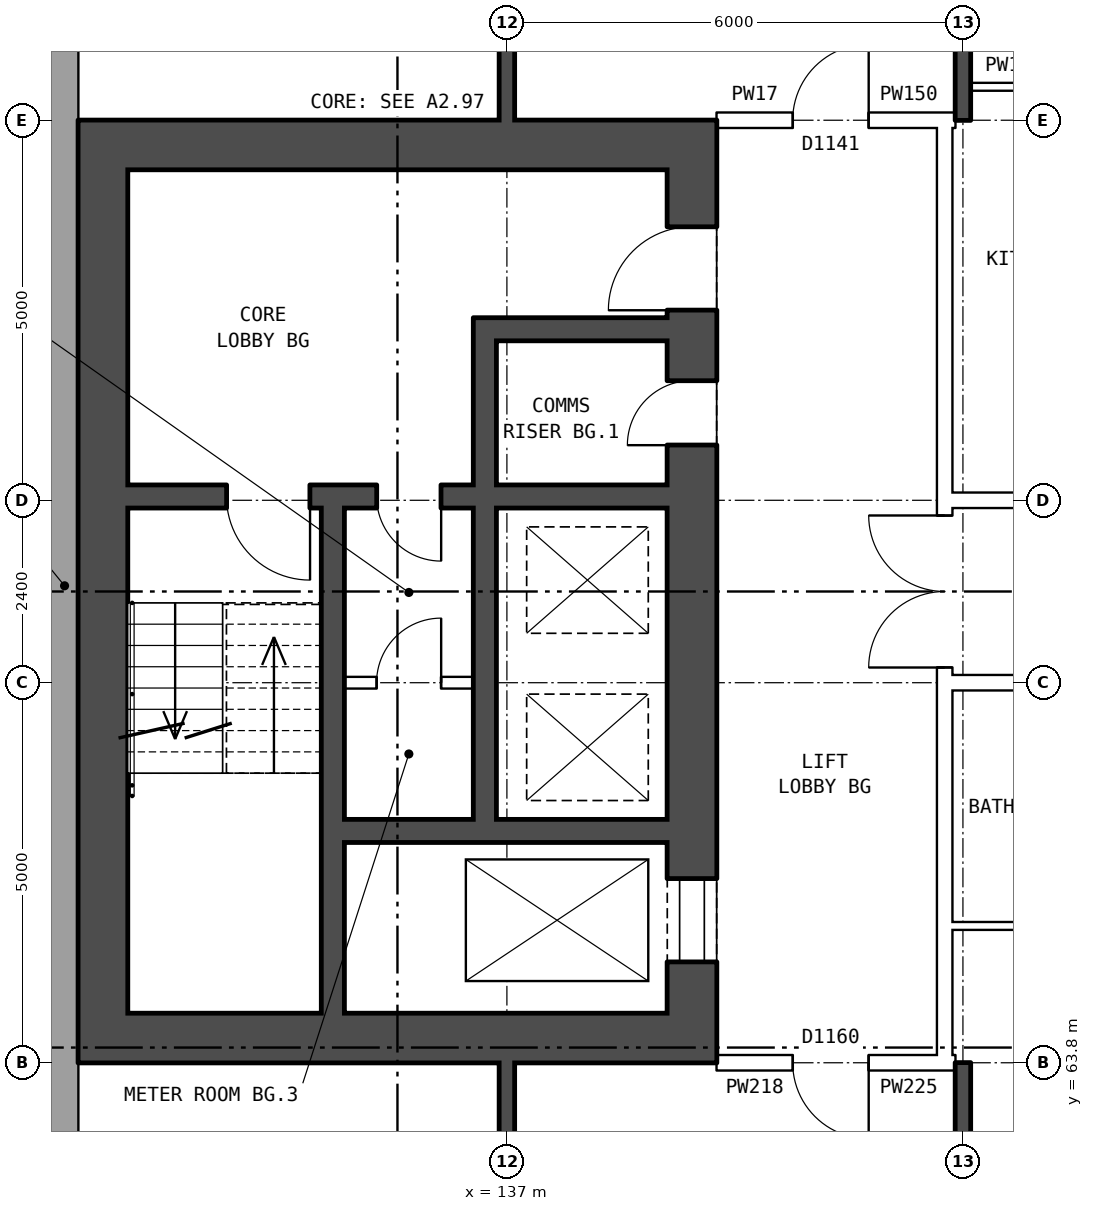
"""IFC4 building model, lengths in metres.
Left out: names, types, materials, properties, quantities, classifications, styles, units other than length and angle.
Written with IfcOpenShell. Run it as: python <this file> out.ifc"""

import sys

from ifc_helpers import new_model, si_unit, direction, frame, frame_2d, origin, place, context, subcontext, project, spatial, rectangle, extrude, element, fill, save


model = new_model("IFC4")
c1 = context("Model", 3, precision=1e-05, world=origin(), true_north=direction((0.0, 1.0)))
c2 = subcontext(c1, "Body", "Model", "MODEL_VIEW")
j1 = project(units=[si_unit("LENGTHUNIT", "METRE"), si_unit("PLANEANGLEUNIT", "RADIAN")], contexts=[c1])
p1 = place(None, origin())
s1 = spatial("IfcSite", under=j1, at=p1, CompositionType="ELEMENT")
p2 = place(p1, origin())
s2 = spatial("IfcBuilding", under=s1, at=p2, CompositionType="ELEMENT")
p3 = place(p2, frame((0.0, 0.0, 99.5)))
s3 = spatial("IfcBuildingStorey", under=s2, at=p3, CompositionType="ELEMENT", Elevation=99.5)
p4 = place(p3, frame((131.18, 82.925, 0.0), z_axis=(0.0, 0.0, 1.0), x_axis=(0.0, -1.0, 0.0)))
e1 = element("IfcWall", 1, at=p4, inside=s3, PredefinedType="STANDARD", context=c2, shape_type="SweptSolid", body=[
    extrude(rectangle(XDim=25.851, YDim=0.36, at=frame_2d((12.925, 0.0))), origin(), (0.0, 0.0, 1.0), 2.85),
])
p5 = place(p4, frame((1.625, 0.0, 0.8)))
e2 = element("IfcOpeningElement", 2, at=p5, cuts=e1, PredefinedType="OPENING", context=c2, shape_type="SweptSolid", body=[
    extrude(rectangle(XDim=1.6, YDim=1.8, at=frame_2d((0.8, 0.9))), frame((0.0, 0.19, 0.0), z_axis=(0.0, -1.0, 0.0), x_axis=(1.0, 0.0, 0.0)), (0.0, 0.0, 1.0), 0.38),
])
p6 = place(p4, frame((3.525, 0.0, 1.7)))
e3 = element("IfcOpeningElement", 3, at=p6, cuts=e1, PredefinedType="OPENING", context=c2, shape_type="SweptSolid", body=[
    extrude(rectangle(XDim=1.4, YDim=0.9, at=frame_2d((0.7, 0.45))), frame((0.0, 0.19, 0.0), z_axis=(0.0, -1.0, 0.0), x_axis=(1.0, 0.0, 0.0)), (0.0, 0.0, 1.0), 0.38),
])
p7 = place(p4, frame((20.775, 0.0, 1.7)))
e4 = element("IfcOpeningElement", 4, at=p7, cuts=e1, PredefinedType="OPENING", context=c2, shape_type="SweptSolid", body=[
    extrude(rectangle(XDim=1.4, YDim=0.9, at=frame_2d((0.7, 0.45))), frame((0.0, 0.19, 0.0), z_axis=(0.0, -1.0, 0.0), x_axis=(1.0, 0.0, 0.0)), (0.0, 0.0, 1.0), 0.38),
])
p8 = place(p4, frame((22.625, 0.0, 0.8)))
e5 = element("IfcOpeningElement", 5, at=p8, cuts=e1, PredefinedType="OPENING", context=c2, shape_type="SweptSolid", body=[
    extrude(rectangle(XDim=1.6, YDim=1.8, at=frame_2d((0.8, 0.9))), frame((0.0, 0.19, 0.0), z_axis=(0.0, -1.0, 0.0), x_axis=(1.0, 0.0, 0.0)), (0.0, 0.0, 1.0), 0.38),
])
p9 = place(p3, frame((139.435, 64.45, 0.0), z_axis=(0.0, 0.0, 1.0), x_axis=(0.0, 1.0, 0.0)))
e6 = element("IfcWall", 6, at=p9, inside=s3, PredefinedType="SHEAR", context=c2, shape_type="SweptSolid", body=[
    extrude(rectangle(XDim=11.1, YDim=0.65, at=frame_2d((5.55, 0.0))), origin(), (0.0, 0.0, 1.0), 2.85),
])
p10 = place(p9, frame((0.675, 0.0, 0.0)))
e7 = element("IfcOpeningElement", 7, at=p10, cuts=e6, PredefinedType="OPENING", context=c2, shape_type="SweptSolid", body=[
    extrude(rectangle(XDim=1.1, YDim=2.1, at=frame_2d((0.55, 1.05))), frame((0.0, 0.335, 0.0), z_axis=(0.0, -1.0, 0.0), x_axis=(1.0, 0.0, 0.0)), (0.0, 0.0, 1.0), 0.67),
])
p11 = place(p9, frame((9.25, 0.0, 0.0)))
e8 = element("IfcOpeningElement", 8, at=p11, cuts=e6, PredefinedType="OPENING", context=c2, shape_type="SweptSolid", body=[
    extrude(rectangle(XDim=1.1, YDim=2.1, at=frame_2d((0.55, 1.05))), frame((0.0, 0.335, 0.0), z_axis=(0.0, -1.0, 0.0), x_axis=(1.0, 0.0, 0.0)), (0.0, 0.0, 1.0), 0.67),
])
p12 = place(p9, frame((7.475, 0.0, 0.0)))
e9 = element("IfcOpeningElement", 9, at=p12, cuts=e6, PredefinedType="OPENING", context=c2, shape_type="SweptSolid", body=[
    extrude(rectangle(XDim=0.85, YDim=2.1, at=frame_2d((0.425, 1.05))), frame((0.0, 0.335, 0.0), z_axis=(0.0, -1.0, 0.0), x_axis=(1.0, 0.0, 0.0)), (0.0, 0.0, 1.0), 0.67),
])
p13 = place(p3, frame((131.685, 64.45, 0.0), z_axis=(0.0, 0.0, 1.0), x_axis=(0.0, 1.0, 0.0)))
e10 = element("IfcWall", 10, at=p13, inside=s3, PredefinedType="SHEAR", context=c2, shape_type="SweptSolid", body=[
    extrude(rectangle(XDim=11.1, YDim=0.65, at=frame_2d((5.55, 0.0))), origin(), (0.0, 0.0, 1.0), 2.85),
])
for number, where, z_axis, x_axis in (
    (11, (139.76, 64.125, 0.0), (0.0, 0.0, 1.0), (-1.0, 0.0, 0.0)),
    (12, (139.76, 75.875, 0.0), (0.0, 0.0, 1.0), (-1.0, 0.0, 0.0)),
):
    element("IfcWall", number, at=place(p3, frame(where, z_axis=z_axis, x_axis=x_axis)), inside=s3, PredefinedType="SHEAR", context=c2, shape_type="SweptSolid", body=[
        extrude(rectangle(XDim=8.4, YDim=0.65, at=frame_2d((4.2, 0.0))), origin(), (0.0, 0.0, 1.0), 2.85),
    ])
p14 = place(p3, frame((139.11, 66.85, 0.0), z_axis=(0.0, 0.0, 1.0), x_axis=(-1.0, 0.0, 0.0)))
e13 = element("IfcWall", 13, at=p14, inside=s3, PredefinedType="SHEAR", context=c2, shape_type="SweptSolid", body=[
    extrude(rectangle(XDim=4.25, YDim=0.3, at=frame_2d((2.125, 0.0))), origin(), (0.0, 0.0, 1.0), 2.85),
])
p15 = place(p3, frame((136.56, 68.8, 0.0), z_axis=(0.0, 0.0, 1.0), x_axis=(-1.0, 0.0, 0.0)))
e14 = element("IfcWall", 14, at=p15, inside=s3, PredefinedType="PARTITIONING", context=c2, shape_type="SweptSolid", body=[
    extrude(rectangle(XDim=1.7, YDim=0.15, at=frame_2d((0.85, 0.0))), origin(), (0.0, 0.0, 1.0), 2.85),
])
p16 = place(p15, frame((0.425, 0.0, 0.0)))
e15 = element("IfcOpeningElement", 15, at=p16, cuts=e14, PredefinedType="OPENING", context=c2, shape_type="SweptSolid", body=[
    extrude(rectangle(XDim=0.85, YDim=2.1, at=frame_2d((0.425, 1.05))), frame((0.0, 0.085, 0.0), z_axis=(0.0, -1.0, 0.0), x_axis=(1.0, 0.0, 0.0)), (0.0, 0.0, 1.0), 0.17),
])
p17 = place(p3, frame((139.11, 71.25, 0.0), z_axis=(0.0, 0.0, 1.0), x_axis=(-1.0, 0.0, 0.0)))
e16 = element("IfcWall", 16, at=p17, inside=s3, PredefinedType="SHEAR", context=c2, shape_type="SweptSolid", body=[
    extrude(rectangle(XDim=7.1, YDim=0.3, at=frame_2d((3.55, 0.0))), origin(), (0.0, 0.0, 1.0), 2.85),
])
p18 = place(p17, frame((4.7, 0.0, 0.0)))
e17 = element("IfcOpeningElement", 17, at=p18, cuts=e16, PredefinedType="OPENING", context=c2, shape_type="SweptSolid", body=[
    extrude(rectangle(XDim=1.1, YDim=2.1, at=frame_2d((0.55, 1.05))), frame((0.0, 0.16, 0.0), z_axis=(0.0, -1.0, 0.0), x_axis=(1.0, 0.0, 0.0)), (0.0, 0.0, 1.0), 0.32),
])
p19 = place(p17, frame((2.975, 0.0, 0.0)))
e18 = element("IfcOpeningElement", 18, at=p19, cuts=e16, PredefinedType="OPENING", context=c2, shape_type="SweptSolid", body=[
    extrude(rectangle(XDim=0.85, YDim=2.1, at=frame_2d((0.425, 1.05))), frame((0.0, 0.16, 0.0), z_axis=(0.0, -1.0, 0.0), x_axis=(1.0, 0.0, 0.0)), (0.0, 0.0, 1.0), 0.32),
])
p20 = place(p3, frame((139.11, 73.45, 0.0), z_axis=(0.0, 0.0, 1.0), x_axis=(-1.0, 0.0, 0.0)))
e19 = element("IfcWall", 19, at=p20, inside=s3, PredefinedType="SHEAR", context=c2, shape_type="SweptSolid", body=[
    extrude(rectangle(XDim=2.25, YDim=0.3, at=frame_2d((1.125, 0.0))), origin(), (0.0, 0.0, 1.0), 2.85),
])
p21 = place(p3, frame((136.71, 67.0, 0.0), z_axis=(0.0, 0.0, 1.0), x_axis=(0.0, 1.0, 0.0)))
e20 = element("IfcWall", 20, at=p21, inside=s3, PredefinedType="SHEAR", context=c2, shape_type="SweptSolid", body=[
    extrude(rectangle(XDim=4.1, YDim=0.3, at=frame_2d((2.05, 0.0))), origin(), (0.0, 0.0, 1.0), 2.85),
])
p22 = place(p3, frame((136.71, 71.4, 0.0), z_axis=(0.0, 0.0, 1.0), x_axis=(0.0, 1.0, 0.0)))
e21 = element("IfcWall", 21, at=p22, inside=s3, PredefinedType="SHEAR", context=c2, shape_type="SweptSolid", body=[
    extrude(rectangle(XDim=2.2, YDim=0.3, at=frame_2d((1.1, 0.0))), origin(), (0.0, 0.0, 1.0), 2.85),
])
p23 = place(p3, frame((134.71, 64.45, 0.0), z_axis=(0.0, 0.0, 1.0), x_axis=(0.0, 1.0, 0.0)))
e22 = element("IfcWall", 22, at=p23, inside=s3, PredefinedType="SHEAR", context=c2, shape_type="SweptSolid", body=[
    extrude(rectangle(XDim=6.65, YDim=0.3, at=frame_2d((3.325, 0.0))), origin(), (0.0, 0.0, 1.0), 2.85),
])
p24 = place(p3, frame((142.76, 63.9, 0.0), z_axis=(0.0, 0.0, 1.0), x_axis=(0.0, 1.0, 0.0)))
e23 = element("IfcWall", 23, at=p24, inside=s3, PredefinedType="PARTITIONING", context=c2, shape_type="SweptSolid", body=[
    extrude(rectangle(XDim=12.2, YDim=0.2, at=frame_2d((6.1, 0.0))), origin(), (0.0, 0.0, 1.0), 2.85),
])
p25 = place(p24, frame((5.1, 0.0, 0.0)))
e24 = element("IfcOpeningElement", 24, at=p25, cuts=e23, PredefinedType="OPENING", context=c2, shape_type="SweptSolid", body=[
    extrude(rectangle(XDim=2.0, YDim=2.1, at=frame_2d((1.0, 1.05))), frame((0.0, 0.11, 0.0), z_axis=(0.0, -1.0, 0.0), x_axis=(1.0, 0.0, 0.0)), (0.0, 0.0, 1.0), 0.22),
])
p26 = place(p3, frame((139.76, 63.8, 0.0), z_axis=(0.0, 0.0, 1.0), x_axis=(1.0, 0.0, 0.0)))
e25 = element("IfcWall", 25, at=p26, inside=s3, PredefinedType="PARTITIONING", context=c2, shape_type="SweptSolid", body=[
    extrude(rectangle(XDim=3.0, YDim=0.2, at=frame_2d((1.5, 0.0))), origin(), (0.0, 0.0, 1.0), 2.85),
])
p27 = place(p26, frame((1.0, 0.0, 0.0)))
e26 = element("IfcOpeningElement", 26, at=p27, cuts=e25, PredefinedType="OPENING", context=c2, shape_type="SweptSolid", body=[
    extrude(rectangle(XDim=1.0, YDim=2.1, at=frame_2d((0.5, 1.05))), frame((0.0, 0.11, 0.0), z_axis=(0.0, -1.0, 0.0), x_axis=(1.0, 0.0, 0.0)), (0.0, 0.0, 1.0), 0.22),
])
p28 = place(p3, frame((142.76, 63.8, 0.0), z_axis=(0.0, 0.0, 1.0), x_axis=(1.0, 0.0, 0.0)))
e27 = element("IfcWall", 27, at=p28, inside=s3, PredefinedType="PARTITIONING", context=c2, shape_type="SweptSolid", body=[
    extrude(rectangle(XDim=0.14, YDim=0.2, at=frame_2d((0.07, 0.0))), origin(), (0.0, 0.0, 1.0), 2.85),
])
p29 = place(p3, frame((142.76, 65.6, 0.0), z_axis=(0.0, 0.0, 1.0), x_axis=(1.0, 0.0, 0.0)))
e28 = element("IfcWall", 28, at=p29, inside=s3, PredefinedType="PARTITIONING", context=c2, shape_type="SweptSolid", body=[
    extrude(rectangle(XDim=3.24, YDim=0.1, at=frame_2d((1.62, 0.0))), origin(), (0.0, 0.0, 1.0), 2.85),
])
p30 = place(p3, frame((142.76, 68.8, 0.0), z_axis=(0.0, 0.0, 1.0), x_axis=(1.0, 0.0, 0.0)))
e29 = element("IfcWall", 29, at=p30, inside=s3, PredefinedType="PARTITIONING", context=c2, shape_type="SweptSolid", body=[
    extrude(rectangle(XDim=14.48, YDim=0.2, at=frame_2d((7.24, 0.0))), origin(), (0.0, 0.0, 1.0), 2.85),
])
p31 = place(p30, frame((4.24, 0.0, 0.0)))
e30 = element("IfcOpeningElement", 30, at=p31, cuts=e29, PredefinedType="OPENING", context=c2, shape_type="SweptSolid", body=[
    extrude(rectangle(XDim=1.0, YDim=2.1, at=frame_2d((0.5, 1.05))), frame((0.0, 0.11, 0.0), z_axis=(0.0, -1.0, 0.0), x_axis=(1.0, 0.0, 0.0)), (0.0, 0.0, 1.0), 0.22),
])
p32 = place(p30, frame((7.24, 0.0, 0.0)))
e31 = element("IfcOpeningElement", 31, at=p32, cuts=e29, PredefinedType="OPENING", context=c2, shape_type="SweptSolid", body=[
    extrude(rectangle(XDim=1.0, YDim=2.1, at=frame_2d((0.5, 1.05))), frame((0.0, 0.11, 0.0), z_axis=(0.0, -1.0, 0.0), x_axis=(1.0, 0.0, 0.0)), (0.0, 0.0, 1.0), 0.22),
])
p33 = place(p3, frame((142.76, 71.2, 0.0), z_axis=(0.0, 0.0, 1.0), x_axis=(1.0, 0.0, 0.0)))
e32 = element("IfcWall", 32, at=p33, inside=s3, PredefinedType="PARTITIONING", context=c2, shape_type="SweptSolid", body=[
    extrude(rectangle(XDim=14.48, YDim=0.2, at=frame_2d((7.24, 0.0))), origin(), (0.0, 0.0, 1.0), 2.85),
])
p34 = place(p33, frame((1.12, 0.0, 0.0)))
e33 = element("IfcOpeningElement", 33, at=p34, cuts=e32, PredefinedType="OPENING", context=c2, shape_type="SweptSolid", body=[
    extrude(rectangle(XDim=1.0, YDim=2.1, at=frame_2d((0.5, 1.05))), frame((0.0, 0.11, 0.0), z_axis=(0.0, -1.0, 0.0), x_axis=(1.0, 0.0, 0.0)), (0.0, 0.0, 1.0), 0.22),
])
p35 = place(p33, frame((10.24, 0.0, 0.0)))
e34 = element("IfcOpeningElement", 34, at=p35, cuts=e32, PredefinedType="OPENING", context=c2, shape_type="SweptSolid", body=[
    extrude(rectangle(XDim=1.0, YDim=2.1, at=frame_2d((0.5, 1.05))), frame((0.0, 0.11, 0.0), z_axis=(0.0, -1.0, 0.0), x_axis=(1.0, 0.0, 0.0)), (0.0, 0.0, 1.0), 0.22),
])
p36 = place(p3, frame((139.76, 76.2, 0.0), z_axis=(0.0, 0.0, 1.0), x_axis=(1.0, 0.0, 0.0)))
e35 = element("IfcWall", 35, at=p36, inside=s3, PredefinedType="PARTITIONING", context=c2, shape_type="SweptSolid", body=[
    extrude(rectangle(XDim=3.0, YDim=0.2, at=frame_2d((1.5, 0.0))), origin(), (0.0, 0.0, 1.0), 2.85),
])
p37 = place(p36, frame((1.0, 0.0, 0.0)))
e36 = element("IfcOpeningElement", 36, at=p37, cuts=e35, PredefinedType="OPENING", context=c2, shape_type="SweptSolid", body=[
    extrude(rectangle(XDim=1.0, YDim=2.1, at=frame_2d((0.5, 1.05))), frame((0.0, 0.11, 0.0), z_axis=(0.0, -1.0, 0.0), x_axis=(1.0, 0.0, 0.0)), (0.0, 0.0, 1.0), 0.22),
])
p38 = place(p3, frame((142.76, 76.2, 0.0), z_axis=(0.0, 0.0, 1.0), x_axis=(1.0, 0.0, 0.0)))
e37 = element("IfcWall", 37, at=p38, inside=s3, PredefinedType="PARTITIONING", context=c2, shape_type="SweptSolid", body=[
    extrude(rectangle(XDim=0.14, YDim=0.2, at=frame_2d((0.07, 0.0))), origin(), (0.0, 0.0, 1.0), 2.85),
])
p39 = place(p3, frame((143.1, 76.64, 0.0), z_axis=(0.0, 0.0, 1.0), x_axis=(1.0, 0.0, 0.0)))
e38 = element("IfcWall", 38, at=p39, inside=s3, PredefinedType="PARTITIONING", context=c2, shape_type="SweptSolid", body=[
    extrude(rectangle(XDim=2.9, YDim=0.1, at=frame_2d((1.45, 0.0))), origin(), (0.0, 0.0, 1.0), 2.85),
])
p40 = place(p39, frame((1.0, 0.0, 0.0)))
e39 = element("IfcOpeningElement", 39, at=p40, cuts=e38, PredefinedType="OPENING", context=c2, shape_type="SweptSolid", body=[
    extrude(rectangle(XDim=0.9, YDim=2.1, at=frame_2d((0.45, 1.05))), frame((0.0, 0.06, 0.0), z_axis=(0.0, -1.0, 0.0), x_axis=(1.0, 0.0, 0.0)), (0.0, 0.0, 1.0), 0.12),
])
p41 = place(p3, frame((137.0, 54.36, 0.0), z_axis=(0.0, 0.0, 1.0), x_axis=(0.0, 1.0, 0.0)))
e40 = element("IfcWall", 40, at=p41, inside=s3, PredefinedType="SOLIDWALL", context=c2, shape_type="SweptSolid", body=[
    extrude(rectangle(XDim=9.44, YDim=0.2, at=frame_2d((4.72, 0.0))), origin(), (0.0, 0.0, 1.0), 2.85),
])
p42 = place(p41, frame((1.37, 0.0, 0.0)))
e41 = element("IfcOpeningElement", 41, at=p42, cuts=e40, PredefinedType="OPENING", context=c2, shape_type="SweptSolid", body=[
    extrude(rectangle(XDim=0.9, YDim=2.1, at=frame_2d((0.45, 1.05))), frame((0.0, 0.11, 0.0), z_axis=(0.0, -1.0, 0.0), x_axis=(1.0, 0.0, 0.0)), (0.0, 0.0, 1.0), 0.22),
])
p43 = place(p41, frame((7.04, 0.0, 0.0)))
e42 = element("IfcOpeningElement", 42, at=p43, cuts=e40, PredefinedType="OPENING", context=c2, shape_type="SweptSolid", body=[
    extrude(rectangle(XDim=0.9, YDim=2.1, at=frame_2d((0.45, 1.05))), frame((0.0, 0.11, 0.0), z_axis=(0.0, -1.0, 0.0), x_axis=(1.0, 0.0, 0.0)), (0.0, 0.0, 1.0), 0.22),
])
p44 = place(p3, frame((137.0, 76.2, 0.0), z_axis=(0.0, 0.0, 1.0), x_axis=(0.0, 1.0, 0.0)))
e43 = element("IfcWall", 43, at=p44, inside=s3, PredefinedType="SOLIDWALL", context=c2, shape_type="SweptSolid", body=[
    extrude(rectangle(XDim=9.44, YDim=0.2, at=frame_2d((4.72, 0.0))), origin(), (0.0, 0.0, 1.0), 2.85),
])
p45 = place(p44, frame((1.35, 0.0, 0.0)))
e44 = element("IfcOpeningElement", 44, at=p45, cuts=e43, PredefinedType="OPENING", context=c2, shape_type="SweptSolid", body=[
    extrude(rectangle(XDim=0.9, YDim=2.1, at=frame_2d((0.45, 1.05))), frame((0.0, 0.11, 0.0), z_axis=(0.0, -1.0, 0.0), x_axis=(1.0, 0.0, 0.0)), (0.0, 0.0, 1.0), 0.22),
])
for number, where, z_axis, x_axis in (
    (45, (143.0, 54.36, 0.0), (0.0, 0.0, 1.0), (0.0, 1.0, 0.0)),
    (46, (143.0, 76.2, 0.0), (0.0, 0.0, 1.0), (0.0, 1.0, 0.0)),
):
    element("IfcWall", number, at=place(p3, frame(where, z_axis=z_axis, x_axis=x_axis)), inside=s3, PredefinedType="SOLIDWALL", context=c2, shape_type="SweptSolid", body=[
        extrude(rectangle(XDim=9.44, YDim=0.2, at=frame_2d((4.72, 0.0))), origin(), (0.0, 0.0, 1.0), 2.85),
    ])
p46 = place(p10, origin())
e47 = element("IfcDoor", 47, at=p46, inside=s3, OperationType="DOUBLE_DOOR_SLIDING", PredefinedType="DOOR", context=c2, shape_type="SweptSolid", body=[
    extrude(rectangle(XDim=1.1, YDim=2.1, at=frame_2d((0.55, 1.05))), frame((0.0, 0.31, 0.0), z_axis=(0.0, -1.0, 0.0), x_axis=(1.0, 0.0, 0.0)), (0.0, 0.0, 1.0), 0.05),
])
fill(e7, e47)
p47 = place(p11, origin())
e48 = element("IfcDoor", 48, at=p47, inside=s3, OperationType="SINGLE_SWING_LEFT", PredefinedType="DOOR", context=c2, shape_type="SweptSolid", body=[
    extrude(rectangle(XDim=1.1, YDim=2.1, at=frame_2d((0.55, 1.05))), frame((0.0, 0.31, 0.0), z_axis=(0.0, -1.0, 0.0), x_axis=(1.0, 0.0, 0.0)), (0.0, 0.0, 1.0), 0.05),
])
fill(e8, e48)
p48 = place(p18, origin())
e49 = element("IfcDoor", 49, at=p48, inside=s3, OperationType="SINGLE_SWING_LEFT", PredefinedType="DOOR", context=c2, shape_type="SweptSolid", body=[
    extrude(rectangle(XDim=1.1, YDim=2.1, at=frame_2d((0.55, 1.05))), frame((0.0, 0.025, 0.0), z_axis=(0.0, -1.0, 0.0), x_axis=(1.0, 0.0, 0.0)), (0.0, 0.0, 1.0), 0.05),
])
fill(e17, e49)
p49 = place(p12, origin())
e50 = element("IfcDoor", 50, at=p49, inside=s3, OperationType="SINGLE_SWING_LEFT", PredefinedType="DOOR", context=c2, shape_type="SweptSolid", body=[
    extrude(rectangle(XDim=0.85, YDim=2.1, at=frame_2d((0.425, 1.05))), frame((0.0, 0.31, 0.0), z_axis=(0.0, -1.0, 0.0), x_axis=(1.0, 0.0, 0.0)), (0.0, 0.0, 1.0), 0.05),
])
fill(e9, e50)
p50 = place(p19, origin())
e51 = element("IfcDoor", 51, at=p50, inside=s3, OperationType="SINGLE_SWING_LEFT", PredefinedType="DOOR", context=c2, shape_type="SweptSolid", body=[
    extrude(rectangle(XDim=0.85, YDim=2.1, at=frame_2d((0.425, 1.05))), frame((0.0, 0.025, 0.0), z_axis=(0.0, -1.0, 0.0), x_axis=(1.0, 0.0, 0.0)), (0.0, 0.0, 1.0), 0.05),
])
fill(e18, e51)
p51 = place(p16, frame((0.85, 0.0, 0.0), z_axis=(0.0, 0.0, 1.0), x_axis=(-1.0, 0.0, 0.0)))
e52 = element("IfcDoor", 52, at=p51, inside=s3, OperationType="SINGLE_SWING_RIGHT", PredefinedType="DOOR", context=c2, shape_type="SweptSolid", body=[
    extrude(rectangle(XDim=0.85, YDim=2.1, at=frame_2d((0.425, 1.05))), frame((0.0, 0.025, 0.0), z_axis=(0.0, -1.0, 0.0), x_axis=(1.0, 0.0, 0.0)), (0.0, 0.0, 1.0), 0.05),
])
fill(e15, e52)
p52 = place(p25, origin())
e53 = element("IfcDoor", 53, at=p52, inside=s3, OperationType="DOUBLE_DOOR_SINGLE_SWING", PredefinedType="DOOR", context=c2, shape_type="SweptSolid", body=[
    extrude(rectangle(XDim=2.0, YDim=2.1, at=frame_2d((1.0, 1.05))), frame((0.0, 0.025, 0.0), z_axis=(0.0, -1.0, 0.0), x_axis=(1.0, 0.0, 0.0)), (0.0, 0.0, 1.0), 0.05),
])
fill(e24, e53)
p53 = place(p27, frame((1.0, 0.0, 0.0), z_axis=(0.0, 0.0, 1.0), x_axis=(-1.0, 0.0, 0.0)))
e54 = element("IfcDoor", 54, at=p53, inside=s3, OperationType="SINGLE_SWING_LEFT", PredefinedType="DOOR", context=c2, shape_type="SweptSolid", body=[
    extrude(rectangle(XDim=1.0, YDim=2.1, at=frame_2d((0.5, 1.05))), frame((0.0, 0.025, 0.0), z_axis=(0.0, -1.0, 0.0), x_axis=(1.0, 0.0, 0.0)), (0.0, 0.0, 1.0), 0.05),
])
fill(e26, e54)
p54 = place(p37, origin())
e55 = element("IfcDoor", 55, at=p54, inside=s3, OperationType="SINGLE_SWING_RIGHT", PredefinedType="DOOR", context=c2, shape_type="SweptSolid", body=[
    extrude(rectangle(XDim=1.0, YDim=2.1, at=frame_2d((0.5, 1.05))), frame((0.0, 0.025, 0.0), z_axis=(0.0, -1.0, 0.0), x_axis=(1.0, 0.0, 0.0)), (0.0, 0.0, 1.0), 0.05),
])
fill(e36, e55)
save(model, sys.argv[1])
